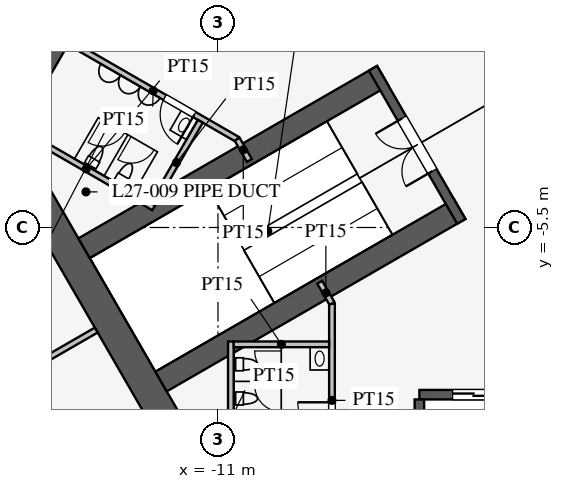
"""IFC4 building model, lengths in metres.
Left out: names, types, materials, properties, quantities, classifications, styles, units other than length and angle.
Written with IfcOpenShell. Run it as: python <this file> out.ifc"""

import sys

from ifc_helpers import new_model, si_unit, direction, frame, frame_2d, origin, place, context, subcontext, project, spatial, rectangle, extrude, element, fill, save


model = new_model("IFC4")
c1 = context("Model", 3, precision=1e-05, world=origin(), true_north=direction((0.0, 1.0)))
c2 = subcontext(c1, "Body", "Model", "MODEL_VIEW")
j1 = project(units=[si_unit("LENGTHUNIT", "METRE"), si_unit("PLANEANGLEUNIT", "RADIAN")], contexts=[c1])
p1 = place(None, origin())
s1 = spatial("IfcSite", under=j1, at=p1, CompositionType="ELEMENT")
p2 = place(p1, origin())
s2 = spatial("IfcBuilding", under=s1, at=p2, CompositionType="ELEMENT")
p3 = place(p2, frame((0.0, 0.0, 119.9)))
s3 = spatial("IfcBuildingStorey", under=s2, at=p3, CompositionType="ELEMENT", Elevation=119.9)
p4 = place(p3, frame((-5.773, 16.0, 0.0), z_axis=(0.0, 0.0, 1.0), x_axis=(-0.500002442456, -0.866023993627, 0.0)))
e1 = element("IfcWall", 1, at=p4, inside=s3, PredefinedType="SHEAR", context=c2, shape_type="SweptSolid", body=[
    extrude(rectangle(XDim=21.939, YDim=0.8, at=frame_2d((10.97, 0.0))), origin(), (0.0, 0.0, 1.0), 4.2),
])
p5 = place(p4, frame((17.27, 0.0, 0.0)))
e2 = element("IfcOpeningElement", 2, at=p5, cuts=e1, PredefinedType="OPENING", context=c2, shape_type="SweptSolid", body=[
    extrude(rectangle(XDim=1.2, YDim=2.1, at=frame_2d((0.6, 1.05))), frame((0.0, 0.41, 0.0), z_axis=(0.0, -1.0, 0.0), x_axis=(1.0, 0.0, 0.0)), (0.0, 0.0, 1.0), 0.82),
])
p6 = place(p4, frame((3.47, 0.0, 0.0)))
e3 = element("IfcOpeningElement", 3, at=p6, cuts=e1, PredefinedType="OPENING", context=c2, shape_type="SweptSolid", body=[
    extrude(rectangle(XDim=1.2, YDim=2.1, at=frame_2d((0.6, 1.05))), frame((0.0, 0.41, 0.0), z_axis=(0.0, -1.0, 0.0), x_axis=(1.0, 0.0, 0.0)), (0.0, 0.0, 1.0), 0.82),
])
p7 = place(p3, frame((-16.743, -3.0, 0.0), z_axis=(0.0, 0.0, 1.0), x_axis=(0.499995765644, -0.866027848477, 0.0)))
e4 = element("IfcWall", 4, at=p7, inside=s3, PredefinedType="SHEAR", context=c2, shape_type="SweptSolid", body=[
    extrude(rectangle(XDim=11.547, YDim=0.8, at=frame_2d((5.773, 0.0))), origin(), (0.0, 0.0, 1.0), 4.2),
])
p8 = place(p3, frame((-5.7, -9.9, 0.0), z_axis=(0.0, 0.0, 1.0), x_axis=(1.0, 0.0, 0.0)))
e5 = element("IfcWall", 5, at=p8, inside=s3, PredefinedType="SHEAR", context=c2, shape_type="SweptSolid", body=[
    extrude(rectangle(XDim=11.4, YDim=0.25, at=frame_2d((5.7, 0.0))), origin(), (0.0, 0.0, 1.0), 4.2),
])
p9 = place(p8, frame((0.875, 0.0, 0.0)))
e6 = element("IfcOpeningElement", 6, at=p9, cuts=e5, PredefinedType="OPENING", context=c2, shape_type="SweptSolid", body=[
    extrude(rectangle(XDim=1.1, YDim=2.2, at=frame_2d((0.55, 1.1))), frame((0.0, 0.135, 0.0), z_axis=(0.0, -1.0, 0.0), x_axis=(1.0, 0.0, 0.0)), (0.0, 0.0, 1.0), 0.27),
])
p10 = place(p8, frame((3.725, 0.0, 0.0)))
e7 = element("IfcOpeningElement", 7, at=p10, cuts=e5, PredefinedType="OPENING", context=c2, shape_type="SweptSolid", body=[
    extrude(rectangle(XDim=1.1, YDim=2.2, at=frame_2d((0.55, 1.1))), frame((0.0, 0.135, 0.0), z_axis=(0.0, -1.0, 0.0), x_axis=(1.0, 0.0, 0.0)), (0.0, 0.0, 1.0), 0.27),
])
p11 = place(p8, frame((6.575, 0.0, 0.0)))
e8 = element("IfcOpeningElement", 8, at=p11, cuts=e5, PredefinedType="OPENING", context=c2, shape_type="SweptSolid", body=[
    extrude(rectangle(XDim=1.1, YDim=2.2, at=frame_2d((0.55, 1.1))), frame((0.0, 0.135, 0.0), z_axis=(0.0, -1.0, 0.0), x_axis=(1.0, 0.0, 0.0)), (0.0, 0.0, 1.0), 0.27),
])
p12 = place(p8, frame((9.425, 0.0, 0.0)))
e9 = element("IfcOpeningElement", 9, at=p12, cuts=e5, PredefinedType="OPENING", context=c2, shape_type="SweptSolid", body=[
    extrude(rectangle(XDim=1.1, YDim=2.2, at=frame_2d((0.55, 1.1))), frame((0.0, 0.135, 0.0), z_axis=(0.0, -1.0, 0.0), x_axis=(1.0, 0.0, 0.0)), (0.0, 0.0, 1.0), 0.27),
])
p13 = place(p3, frame((-5.7, -10.025, 0.0), z_axis=(0.0, 0.0, 1.0), x_axis=(0.0, -1.0, 0.0)))
e10 = element("IfcWall", 10, at=p13, inside=s3, PredefinedType="SHEAR", context=c2, shape_type="SweptSolid", body=[
    extrude(rectangle(XDim=2.575, YDim=0.25, at=frame_2d((1.288, 0.0))), origin(), (0.0, 0.0, 1.0), 4.2),
])
for number, where, z_axis, x_axis in (
    (11, (-6.663, -1.509, 0.0), (0.0, 0.0, 1.0), (-0.866, -0.5, 0.0)),
    (12, (-4.638, -5.016, 0.0), (0.0, 0.0, 1.0), (-0.866, -0.5, 0.0)),
):
    element("IfcWall", number, at=place(p3, frame(where, z_axis=z_axis, x_axis=x_axis)), inside=s3, PredefinedType="SHEAR", context=c2, shape_type="SweptSolid", body=[
        extrude(rectangle(XDim=9.075, YDim=0.6, at=frame_2d((4.538, 0.0))), origin(), (0.0, 0.0, 1.0), 4.2),
    ])
p14 = place(p3, frame((-6.922, -1.312, 0.0), z_axis=(0.0, 0.0, 1.0), x_axis=(0.499984536904, -0.866034331223, 0.0)))
e13 = element("IfcWall", 13, at=p14, inside=s3, PredefinedType="SHEAR", context=c2, shape_type="SweptSolid", body=[
    extrude(rectangle(XDim=4.65, YDim=0.25, at=frame_2d((2.325, 0.0))), origin(), (0.0, 0.0, 1.0), 4.2),
])
p15 = place(p14, frame((1.525, 0.0, 0.0)))
e14 = element("IfcOpeningElement", 14, at=p15, cuts=e13, PredefinedType="OPENING", context=c2, shape_type="SweptSolid", body=[
    extrude(rectangle(XDim=1.6, YDim=2.1, at=frame_2d((0.8, 1.05))), frame((0.0, 0.135, 0.0), z_axis=(0.0, -1.0, 0.0), x_axis=(1.0, 0.0, 0.0)), (0.0, 0.0, 1.0), 0.27),
])
p16 = place(p3, frame((-8.0, -7.5, 0.0), z_axis=(0.0, 0.0, 1.0), x_axis=(0.0, -1.0, 0.0)))
e15 = element("IfcWall", 15, at=p16, inside=s3, PredefinedType="PARTITIONING", context=c2, shape_type="SweptSolid", body=[
    extrude(rectangle(XDim=5.1, YDim=0.15, at=frame_2d((2.55, 0.0))), origin(), (0.0, 0.0, 1.0), 4.0),
])
p17 = place(p16, frame((2.6, 0.0, 0.0)))
e16 = element("IfcOpeningElement", 16, at=p17, cuts=e15, PredefinedType="OPENING", context=c2, shape_type="SweptSolid", body=[
    extrude(rectangle(XDim=0.9, YDim=2.1, at=frame_2d((0.45, 1.05))), frame((0.0, 0.085, 0.0), z_axis=(0.0, -1.0, 0.0), x_axis=(1.0, 0.0, 0.0)), (0.0, 0.0, 1.0), 0.17),
])
p18 = place(p3, frame((-10.495, -3.178, 0.0), z_axis=(0.0, 0.0, 1.0), x_axis=(-0.86602216432, 0.500005610874, 0.0)))
e17 = element("IfcWall", 17, at=p18, inside=s3, PredefinedType="PARTITIONING", context=c2, shape_type="SweptSolid", body=[
    extrude(rectangle(XDim=5.1, YDim=0.15, at=frame_2d((2.55, 0.0))), origin(), (0.0, 0.0, 1.0), 4.0),
])
p19 = place(p18, frame((1.3, 0.0, 0.0)))
e18 = element("IfcOpeningElement", 18, at=p19, cuts=e17, PredefinedType="OPENING", context=c2, shape_type="SweptSolid", body=[
    extrude(rectangle(XDim=0.9, YDim=2.1, at=frame_2d((0.45, 1.05))), frame((0.0, 0.085, 0.0), z_axis=(0.0, -1.0, 0.0), x_axis=(1.0, 0.0, 0.0)), (0.0, 0.0, 1.0), 0.17),
])
for number, where, z_axis, x_axis in (
    (19, (-10.495, -3.178, 0.0), (0.0, 0.0, 1.0), (0.5, -0.866, 0.0)),
    (20, (-8.0, -7.5, 0.0), (0.0, 0.0, 1.0), (-0.5, 0.866, 0.0)),
):
    element("IfcWall", number, at=place(p3, frame(where, z_axis=z_axis, x_axis=x_axis)), inside=s3, PredefinedType="PARTITIONING", context=c2, shape_type="SweptSolid", body=[
        extrude(rectangle(XDim=0.645, YDim=0.15, at=frame_2d((0.323, 0.0))), origin(), (0.0, 0.0, 1.0), 4.0),
    ])
p20 = place(p3, frame((-12.691, -4.982, 0.0), z_axis=(0.0, 0.0, 1.0), x_axis=(-0.8660249478, 0.500000789788, 0.0)))
e21 = element("IfcWall", 21, at=p20, inside=s3, PredefinedType="PARTITIONING", context=c2, shape_type="SweptSolid", body=[
    extrude(rectangle(XDim=4.1, YDim=0.15, at=frame_2d((2.05, 0.0))), origin(), (0.0, 0.0, 1.0), 4.0),
])
p21 = place(p3, frame((-11.464, -2.706, 0.0), z_axis=(0.0, 0.0, 1.0), x_axis=(-0.50001992892, -0.866013897511, 0.0)))
e22 = element("IfcWall", 22, at=p21, inside=s3, PredefinedType="PARTITIONING", context=c2, shape_type="SweptSolid", body=[
    extrude(rectangle(XDim=2.51, YDim=0.15, at=frame_2d((1.255, 0.0))), origin(), (0.0, 0.0, 1.0), 4.0),
])
p22 = place(p3, frame((-10.66, -8.5, 0.0), z_axis=(0.0, 0.0, 1.0), x_axis=(0.0, -1.0, 0.0)))
e23 = element("IfcWall", 23, at=p22, inside=s3, PredefinedType="PARTITIONING", context=c2, shape_type="SweptSolid", body=[
    extrude(rectangle(XDim=4.1, YDim=0.15, at=frame_2d((2.05, 0.0))), origin(), (0.0, 0.0, 1.0), 4.0),
])
p23 = place(p3, frame((-8.075, -8.575, 0.0), z_axis=(0.0, 0.0, 1.0), x_axis=(-1.0, 0.0, 0.0)))
e24 = element("IfcWall", 24, at=p23, inside=s3, PredefinedType="PARTITIONING", context=c2, shape_type="SweptSolid", body=[
    extrude(rectangle(XDim=2.51, YDim=0.15, at=frame_2d((1.255, 0.0))), origin(), (0.0, 0.0, 1.0), 4.0),
])
p24 = place(p3, frame((-14.203, -8.2, 0.0), z_axis=(0.0, 0.0, 1.0), x_axis=(-0.866024668836, -0.500001272966, 0.0)))
e25 = element("IfcWall", 25, at=p24, inside=s3, PredefinedType="PARTITIONING", context=c2, shape_type="SweptSolid", body=[
    extrude(rectangle(XDim=16.65, YDim=0.15, at=frame_2d((8.325, 0.0))), origin(), (0.0, 0.0, 1.0), 2.3),
])
p25 = place(p3, frame((-0.016, 30.491, 0.0), z_axis=(0.0, 0.0, 1.0), x_axis=(-0.50000091641, -0.866024874695, 0.0)))
e26 = element("IfcWall", 26, at=p25, inside=s3, PredefinedType="PARTITIONING", context=c2, shape_type="SweptSolid", body=[
    extrude(rectangle(XDim=52.796, YDim=0.12, at=frame_2d((26.398, 0.0))), origin(), (0.0, 0.0, 1.0), 2.9),
])
p26 = place(p25, frame((10.2, 0.0, 0.15)))
e27 = element("IfcOpeningElement", 27, at=p26, cuts=e26, PredefinedType="OPENING", context=c2, shape_type="SweptSolid", body=[
    extrude(rectangle(XDim=1.8, YDim=2.1, at=frame_2d((0.9, 1.05))), frame((0.0, 0.07, 0.0), z_axis=(0.0, -1.0, 0.0), x_axis=(1.0, 0.0, 0.0)), (0.0, 0.0, 1.0), 0.14),
])
p27 = place(p25, frame((40.8, 0.0, 0.15)))
e28 = element("IfcOpeningElement", 28, at=p27, cuts=e26, PredefinedType="OPENING", context=c2, shape_type="SweptSolid", body=[
    extrude(rectangle(XDim=1.8, YDim=2.1, at=frame_2d((0.9, 1.05))), frame((0.0, 0.07, 0.0), z_axis=(0.0, -1.0, 0.0), x_axis=(1.0, 0.0, 0.0)), (0.0, 0.0, 1.0), 0.14),
])
p28 = place(p17, frame((0.9, 0.0, 0.0), z_axis=(0.0, 0.0, 1.0), x_axis=(-1.0, 0.0, 0.0)))
e29 = element("IfcDoor", 29, at=p28, inside=s3, OperationType="SINGLE_SWING_RIGHT", PredefinedType="DOOR", context=c2, shape_type="SweptSolid", body=[
    extrude(rectangle(XDim=0.9, YDim=2.1, at=frame_2d((0.45, 1.05))), frame((0.0, 0.025, 0.0), z_axis=(0.0, -1.0, 0.0), x_axis=(1.0, 0.0, 0.0)), (0.0, 0.0, 1.0), 0.05),
])
fill(e16, e29)
p29 = place(p19, origin())
e30 = element("IfcDoor", 30, at=p29, inside=s3, OperationType="SINGLE_SWING_LEFT", PredefinedType="DOOR", context=c2, shape_type="SweptSolid", body=[
    extrude(rectangle(XDim=0.9, YDim=2.1, at=frame_2d((0.45, 1.05))), frame((0.0, 0.025, 0.0), z_axis=(0.0, -1.0, 0.0), x_axis=(1.0, 0.0, 0.0)), (0.0, 0.0, 1.0), 0.05),
])
fill(e18, e30)
p30 = place(p15, frame((1.6, 0.0, 0.0), z_axis=(0.0, 0.0, 1.0), x_axis=(-1.0, 0.0, 0.0)))
e31 = element("IfcDoor", 31, at=p30, inside=s3, OperationType="DOUBLE_DOOR_SINGLE_SWING", PredefinedType="DOOR", context=c2, shape_type="SweptSolid", body=[
    extrude(rectangle(XDim=1.6, YDim=2.1, at=frame_2d((0.8, 1.05))), frame((0.0, 0.025, 0.0), z_axis=(0.0, -1.0, 0.0), x_axis=(1.0, 0.0, 0.0)), (0.0, 0.0, 1.0), 0.05),
])
fill(e14, e31)
p31 = place(p9, origin())
e32 = element("IfcDoor", 32, at=p31, inside=s3, OperationType="DOUBLE_DOOR_SLIDING", PredefinedType="DOOR", context=c2, shape_type="SweptSolid", body=[
    extrude(rectangle(XDim=1.1, YDim=2.2, at=frame_2d((0.55, 1.1))), frame((0.0, 0.025, 0.0), z_axis=(0.0, -1.0, 0.0), x_axis=(1.0, 0.0, 0.0)), (0.0, 0.0, 1.0), 0.05),
])
fill(e6, e32)
save(model, sys.argv[1])
